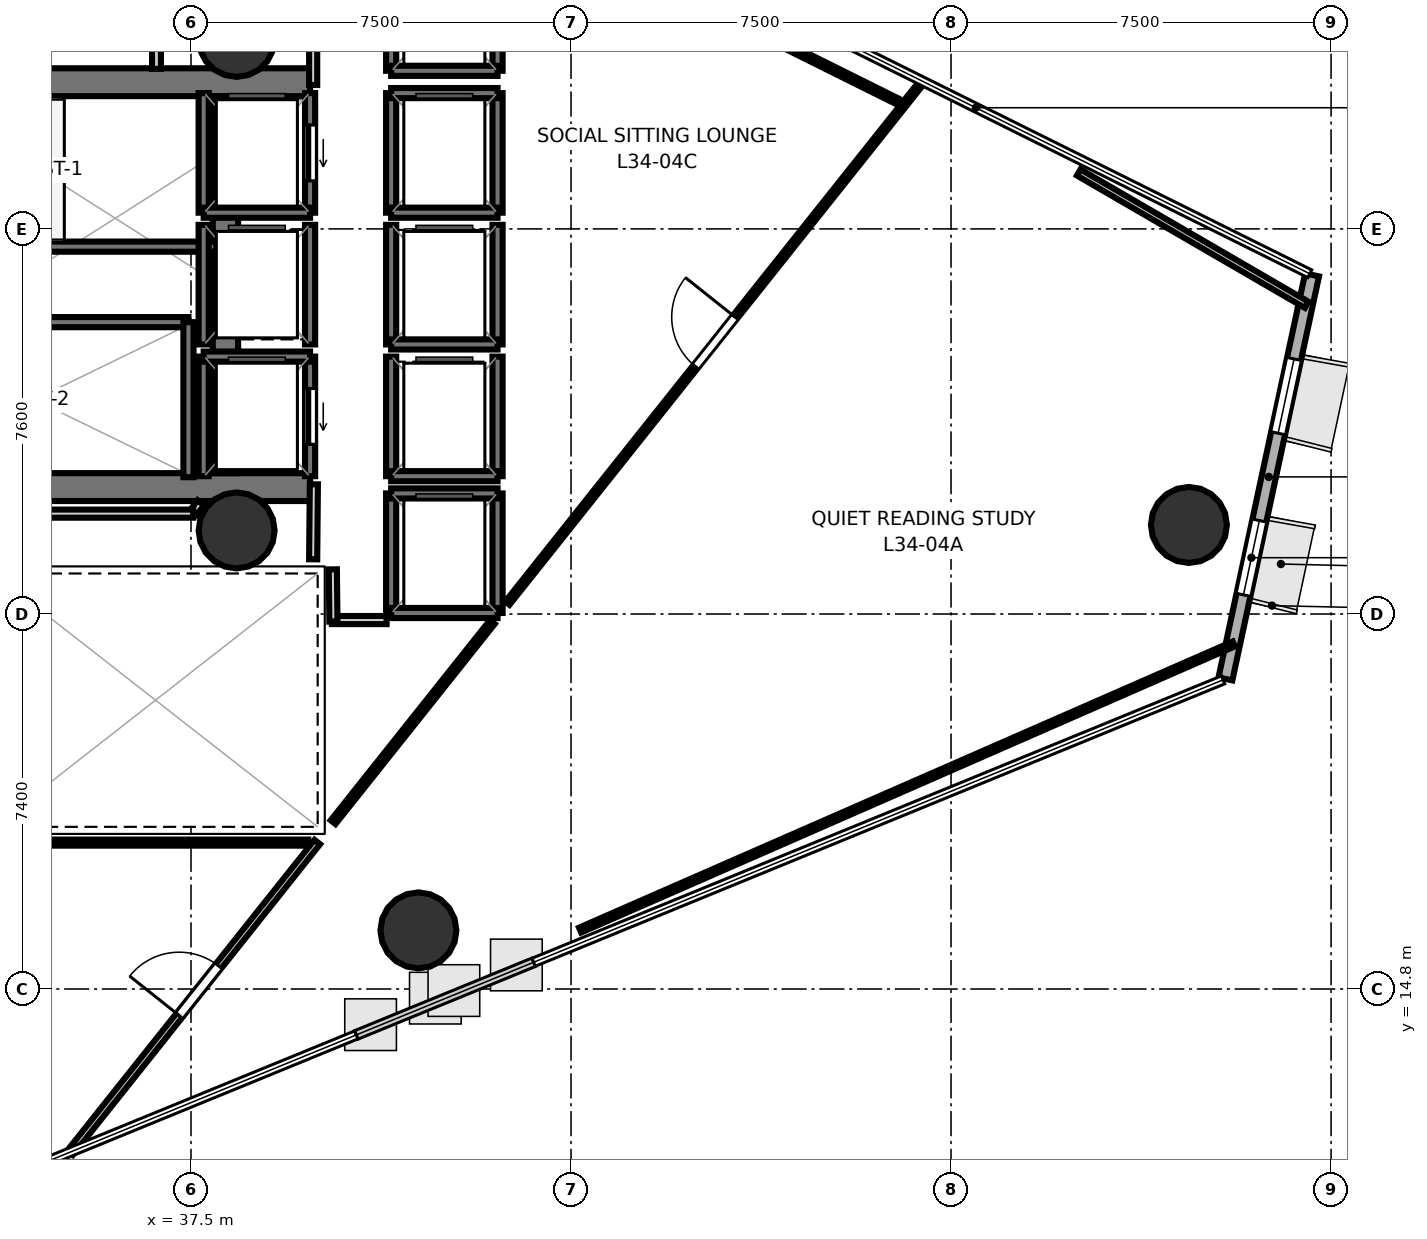
"""IFC4 building model, lengths in metres.
Left out: names, types, materials, properties, quantities, classifications, styles, units other than length and angle.
Written with IfcOpenShell. Run it as: python <this file> out.ifc"""

import sys

from ifc_helpers import new_model, si_unit, direction, frame, frame_2d, origin, origin_2d, place, context, subcontext, project, spatial, rectangle, hollow_circle, extrude, element, fill, save


model = new_model("IFC4")
c1 = context("Model", 3, precision=1e-05, world=origin(), true_north=direction((0.0, 1.0)))
c2 = subcontext(c1, "Body", "Model", "MODEL_VIEW")
j1 = project(units=[si_unit("LENGTHUNIT", "METRE"), si_unit("PLANEANGLEUNIT", "RADIAN")], contexts=[c1])
p1 = place(None, origin())
s1 = spatial("IfcSite", under=j1, at=p1, CompositionType="ELEMENT")
p2 = place(p1, origin())
s2 = spatial("IfcBuilding", under=s1, at=p2, CompositionType="ELEMENT")
p3 = place(p2, frame((0.0, 0.0, 134.8)))
s3 = spatial("IfcBuildingStorey", under=s2, at=p3, CompositionType="ELEMENT", Elevation=134.8)
p4 = place(p3, frame((29.23, 32.695, 0.0), z_axis=(0.0, 0.0, 1.0), x_axis=(1.0, 0.0, 0.0)))
e1 = element("IfcWall", 1, at=p4, inside=s3, PredefinedType="SHEAR", context=c2, shape_type="SweptSolid", body=[
    extrude(rectangle(XDim=10.62, YDim=0.55, at=frame_2d((5.31, 0.0))), origin(), (0.0, 0.0, 1.0), 3.4),
])
p5 = place(p4, frame((0.995, 0.0, 0.0)))
e2 = element("IfcOpeningElement", 2, at=p5, cuts=e1, PredefinedType="OPENING", context=c2, shape_type="SweptSolid", body=[
    extrude(rectangle(XDim=1.25, YDim=2.15, at=frame_2d((0.625, 1.075))), frame((0.0, 0.285, 0.0), z_axis=(0.0, -1.0, 0.0), x_axis=(1.0, 0.0, 0.0)), (0.0, 0.0, 1.0), 0.57),
])
p6 = place(p3, frame((29.23, 24.705, 0.0), z_axis=(0.0, 0.0, 1.0), x_axis=(1.0, 0.0, 0.0)))
e3 = element("IfcWall", 3, at=p6, inside=s3, PredefinedType="SHEAR", context=c2, shape_type="SweptSolid", body=[
    extrude(rectangle(XDim=10.62, YDim=0.55, at=frame_2d((5.31, 0.0))), origin(), (0.0, 0.0, 1.0), 3.4),
])
p7 = place(p6, frame((0.795, 0.0, 0.0)))
e4 = element("IfcOpeningElement", 4, at=p7, cuts=e3, PredefinedType="OPENING", context=c2, shape_type="SweptSolid", body=[
    extrude(rectangle(XDim=1.25, YDim=2.15, at=frame_2d((0.625, 1.075))), frame((0.0, 0.285, 0.0), z_axis=(0.0, -1.0, 0.0), x_axis=(1.0, 0.0, 0.0)), (0.0, 0.0, 1.0), 0.57),
])
p8 = place(p3, frame((38.18, 24.98, 0.0), z_axis=(0.0, 0.0, 1.0), x_axis=(0.0, 1.0, 0.0)))
e5 = element("IfcWall", 5, at=p8, inside=s3, PredefinedType="SHEAR", context=c2, shape_type="SweptSolid", body=[
    extrude(rectangle(XDim=7.44, YDim=0.5, at=frame_2d((3.72, 0.0))), origin(), (0.0, 0.0, 1.0), 3.4),
])
for number, where, z_axis, x_axis in (
    (6, (38.4, 33.55, 0.0), (0.0, 0.0, 1.0), (1.0, 0.0, 0.0)),
    (7, (38.4, 23.85, 0.0), (0.0, 0.0, 1.0), (1.0, 0.0, 0.0)),
    (8, (57.194, 23.958, 0.0), (0.0, 0.0, 1.0), (1.0, 0.0, 0.0)),
    (9, (41.988, 15.957, 0.0), (0.0, 0.0, 1.0), (1.0, 0.0, 0.0)),
):
    element("IfcColumn", number, at=place(p3, frame(where, z_axis=z_axis, x_axis=x_axis)), inside=s3, PredefinedType="COLUMN", context=c2, shape_type="SweptSolid", body=[
        extrude(hollow_circle(Radius=0.75, WallThickness=0.036, at=origin_2d()), origin(), (0.0, 0.0, 1.0), 3.7),
    ])
p9 = place(p3, frame((57.915, 20.92, 0.0), z_axis=(0.0, 0.0, 1.0), x_axis=(0.209674261985, 0.977771294251, 0.0)))
e10 = element("IfcWall", 10, at=p9, inside=s3, PredefinedType="SOLIDWALL", context=c2, shape_type="SweptSolid", body=[
    extrude(rectangle(XDim=8.154, YDim=0.28, at=frame_2d((4.077, 0.0))), origin(), (0.0, 0.0, 1.0), 3.4),
])
p10 = place(p9, frame((1.696, 0.0, 0.85)))
e11 = element("IfcOpeningElement", 11, at=p10, cuts=e10, PredefinedType="OPENING", context=c2, shape_type="SweptSolid", body=[
    extrude(rectangle(XDim=1.5, YDim=2.1, at=frame_2d((0.75, 1.05))), frame((0.0, 0.15, 0.0), z_axis=(0.0, -1.0, 0.0), x_axis=(1.0, 0.0, 0.0)), (0.0, 0.0, 1.0), 0.3),
])
p11 = place(p9, frame((4.958, 0.0, 0.85)))
e12 = element("IfcOpeningElement", 12, at=p11, cuts=e10, PredefinedType="OPENING", context=c2, shape_type="SweptSolid", body=[
    extrude(rectangle(XDim=1.5, YDim=2.1, at=frame_2d((0.75, 1.05))), frame((0.0, 0.15, 0.0), z_axis=(0.0, -1.0, 0.0), x_axis=(1.0, 0.0, 0.0)), (0.0, 0.0, 1.0), 0.3),
])
p12 = place(p3, frame((29.7, 29.45, 0.0), z_axis=(0.0, 0.0, 1.0), x_axis=(1.0, 0.0, 0.0)))
e13 = element("IfcWall", 13, at=p12, inside=s3, PredefinedType="SOLIDWALL", context=c2, shape_type="SweptSolid", body=[
    extrude(rectangle(XDim=8.3, YDim=0.2, at=frame_2d((4.15, 0.0))), origin(), (0.0, 0.0, 1.0), 3.4),
])
p13 = place(p3, frame((29.7, 27.96, 0.0), z_axis=(0.0, 0.0, 1.0), x_axis=(1.0, 0.0, 0.0)))
e14 = element("IfcWall", 14, at=p13, inside=s3, PredefinedType="SOLIDWALL", context=c2, shape_type="SweptSolid", body=[
    extrude(rectangle(XDim=7.75, YDim=0.2, at=frame_2d((3.875, 0.0))), origin(), (0.0, 0.0, 1.0), 3.4),
])
p14 = place(p3, frame((37.45, 24.9, 0.0), z_axis=(0.0, 0.0, 1.0), x_axis=(0.0, 1.0, 0.0)))
e15 = element("IfcWall", 15, at=p14, inside=s3, PredefinedType="SOLIDWALL", context=c2, shape_type="SweptSolid", body=[
    extrude(rectangle(XDim=3.06, YDim=0.2, at=frame_2d((1.53, 0.0))), origin(), (0.0, 0.0, 1.0), 3.4),
])
p15 = place(p3, frame((39.85, 30.12, 0.0), z_axis=(0.0, 0.0, 1.0), x_axis=(0.0, 1.0, 0.0)))
e16 = element("IfcWall", 16, at=p15, inside=s3, PredefinedType="SOLIDWALL", context=c2, shape_type="SweptSolid", body=[
    extrude(rectangle(XDim=2.36, YDim=0.2, at=frame_2d((1.18, 0.0))), origin(), (0.0, 0.0, 1.0), 3.4),
])
p16 = place(p15, frame((0.63, 0.0, 0.0)))
e17 = element("IfcOpeningElement", 17, at=p16, cuts=e16, PredefinedType="OPENING", context=c2, shape_type="SweptSolid", body=[
    extrude(rectangle(XDim=1.1, YDim=2.15, at=frame_2d((0.55, 1.075))), frame((0.0, 0.11, 0.0), z_axis=(0.0, -1.0, 0.0), x_axis=(1.0, 0.0, 0.0)), (0.0, 0.0, 1.0), 0.22),
])
p17 = place(p3, frame((37.75, 30.12, 0.0), z_axis=(0.0, 0.0, 1.0), x_axis=(0.0, 1.0, 0.0)))
e18 = element("IfcWall", 18, at=p17, inside=s3, PredefinedType="SOLIDWALL", context=c2, shape_type="SweptSolid", body=[
    extrude(rectangle(XDim=2.36, YDim=0.2, at=frame_2d((1.18, 0.0))), origin(), (0.0, 0.0, 1.0), 3.4),
])
p18 = place(p3, frame((37.75, 30.12, 0.0), z_axis=(0.0, 0.0, 1.0), x_axis=(1.0, 0.0, 0.0)))
e19 = element("IfcWall", 19, at=p18, inside=s3, PredefinedType="SOLIDWALL", context=c2, shape_type="SweptSolid", body=[
    extrude(rectangle(XDim=2.1, YDim=0.2, at=frame_2d((1.05, 0.0))), origin(), (0.0, 0.0, 1.0), 3.4),
])
p19 = place(p3, frame((39.85, 24.92, 0.0), z_axis=(0.0, 0.0, 1.0), x_axis=(0.0, 1.0, 0.0)))
e20 = element("IfcWall", 20, at=p19, inside=s3, PredefinedType="SOLIDWALL", context=c2, shape_type="SweptSolid", body=[
    extrude(rectangle(XDim=2.36, YDim=0.2, at=frame_2d((1.18, 0.0))), origin(), (0.0, 0.0, 1.0), 3.4),
])
p20 = place(p19, frame((0.63, 0.0, 0.0)))
e21 = element("IfcOpeningElement", 21, at=p20, cuts=e20, PredefinedType="OPENING", context=c2, shape_type="SweptSolid", body=[
    extrude(rectangle(XDim=1.1, YDim=2.15, at=frame_2d((0.55, 1.075))), frame((0.0, 0.11, 0.0), z_axis=(0.0, -1.0, 0.0), x_axis=(1.0, 0.0, 0.0)), (0.0, 0.0, 1.0), 0.22),
])
p21 = place(p3, frame((37.75, 24.92, 0.0), z_axis=(0.0, 0.0, 1.0), x_axis=(0.0, 1.0, 0.0)))
e22 = element("IfcWall", 22, at=p21, inside=s3, PredefinedType="SOLIDWALL", context=c2, shape_type="SweptSolid", body=[
    extrude(rectangle(XDim=2.36, YDim=0.2, at=frame_2d((1.18, 0.0))), origin(), (0.0, 0.0, 1.0), 3.4),
])
p22 = place(p3, frame((37.75, 27.28, 0.0), z_axis=(0.0, 0.0, 1.0), x_axis=(1.0, 0.0, 0.0)))
e23 = element("IfcWall", 23, at=p22, inside=s3, PredefinedType="SOLIDWALL", context=c2, shape_type="SweptSolid", body=[
    extrude(rectangle(XDim=2.1, YDim=0.2, at=frame_2d((1.05, 0.0))), origin(), (0.0, 0.0, 1.0), 3.4),
])
for number, where, z_axis, x_axis in (
    (24, (43.55, 30.12, 0.0), (0.0, 0.0, 1.0), (0.0, 1.0, 0.0)),
    (25, (41.45, 30.12, 0.0), (0.0, 0.0, 1.0), (0.0, 1.0, 0.0)),
):
    element("IfcWall", number, at=place(p3, frame(where, z_axis=z_axis, x_axis=x_axis)), inside=s3, PredefinedType="SOLIDWALL", context=c2, shape_type="SweptSolid", body=[
        extrude(rectangle(XDim=2.36, YDim=0.2, at=frame_2d((1.18, 0.0))), origin(), (0.0, 0.0, 1.0), 3.4),
    ])
for number, where, z_axis, x_axis in (
    (26, (41.45, 32.48, 0.0), (0.0, 0.0, 1.0), (1.0, 0.0, 0.0)),
    (27, (41.45, 30.12, 0.0), (0.0, 0.0, 1.0), (1.0, 0.0, 0.0)),
):
    element("IfcWall", number, at=place(p3, frame(where, z_axis=z_axis, x_axis=x_axis)), inside=s3, PredefinedType="SOLIDWALL", context=c2, shape_type="SweptSolid", body=[
        extrude(rectangle(XDim=2.1, YDim=0.2, at=frame_2d((1.05, 0.0))), origin(), (0.0, 0.0, 1.0), 3.4),
    ])
for number, where, z_axis, x_axis in (
    (28, (43.55, 27.52, 0.0), (0.0, 0.0, 1.0), (0.0, 1.0, 0.0)),
    (29, (41.45, 27.52, 0.0), (0.0, 0.0, 1.0), (0.0, 1.0, 0.0)),
):
    element("IfcWall", number, at=place(p3, frame(where, z_axis=z_axis, x_axis=x_axis)), inside=s3, PredefinedType="SOLIDWALL", context=c2, shape_type="SweptSolid", body=[
        extrude(rectangle(XDim=2.36, YDim=0.2, at=frame_2d((1.18, 0.0))), origin(), (0.0, 0.0, 1.0), 3.4),
    ])
p23 = place(p3, frame((41.45, 27.52, 0.0), z_axis=(0.0, 0.0, 1.0), x_axis=(1.0, 0.0, 0.0)))
e30 = element("IfcWall", 30, at=p23, inside=s3, PredefinedType="SOLIDWALL", context=c2, shape_type="SweptSolid", body=[
    extrude(rectangle(XDim=2.1, YDim=0.2, at=frame_2d((1.05, 0.0))), origin(), (0.0, 0.0, 1.0), 3.4),
])
for number, where, z_axis, x_axis in (
    (31, (43.55, 24.92, 0.0), (0.0, 0.0, 1.0), (0.0, 1.0, 0.0)),
    (32, (41.45, 24.92, 0.0), (0.0, 0.0, 1.0), (0.0, 1.0, 0.0)),
):
    element("IfcWall", number, at=place(p3, frame(where, z_axis=z_axis, x_axis=x_axis)), inside=s3, PredefinedType="SOLIDWALL", context=c2, shape_type="SweptSolid", body=[
        extrude(rectangle(XDim=2.36, YDim=0.2, at=frame_2d((1.18, 0.0))), origin(), (0.0, 0.0, 1.0), 3.4),
    ])
p24 = place(p3, frame((41.45, 24.92, 0.0), z_axis=(0.0, 0.0, 1.0), x_axis=(1.0, 0.0, 0.0)))
e33 = element("IfcWall", 33, at=p24, inside=s3, PredefinedType="SOLIDWALL", context=c2, shape_type="SweptSolid", body=[
    extrude(rectangle(XDim=2.1, YDim=0.2, at=frame_2d((1.05, 0.0))), origin(), (0.0, 0.0, 1.0), 3.4),
])
for number, where, z_axis, x_axis in (
    (34, (39.85, 27.52, 0.0), (0.0, 0.0, 1.0), (0.0, 1.0, 0.0)),
    (35, (37.75, 27.52, 0.0), (0.0, 0.0, 1.0), (0.0, 1.0, 0.0)),
):
    element("IfcWall", number, at=place(p3, frame(where, z_axis=z_axis, x_axis=x_axis)), inside=s3, PredefinedType="SOLIDWALL", context=c2, shape_type="SweptSolid", body=[
        extrude(rectangle(XDim=2.36, YDim=0.2, at=frame_2d((1.18, 0.0))), origin(), (0.0, 0.0, 1.0), 3.4),
    ])
for number, where, z_axis, x_axis in (
    (36, (43.55, 22.22, 0.0), (0.0, 0.0, 1.0), (0.0, 1.0, 0.0)),
    (37, (41.45, 22.22, 0.0), (0.0, 0.0, 1.0), (0.0, 1.0, 0.0)),
):
    element("IfcWall", number, at=place(p3, frame(where, z_axis=z_axis, x_axis=x_axis)), inside=s3, PredefinedType="SOLIDWALL", context=c2, shape_type="SweptSolid", body=[
        extrude(rectangle(XDim=2.36, YDim=0.2, at=frame_2d((1.18, 0.0))), origin(), (0.0, 0.0, 1.0), 3.4),
    ])
for number, where, z_axis, x_axis in (
    (38, (41.45, 24.58, 0.0), (0.0, 0.0, 1.0), (1.0, 0.0, 0.0)),
    (39, (41.45, 22.22, 0.0), (0.0, 0.0, 1.0), (1.0, 0.0, 0.0)),
):
    element("IfcWall", number, at=place(p3, frame(where, z_axis=z_axis, x_axis=x_axis)), inside=s3, PredefinedType="SOLIDWALL", context=c2, shape_type="SweptSolid", body=[
        extrude(rectangle(XDim=2.1, YDim=0.2, at=frame_2d((1.05, 0.0))), origin(), (0.0, 0.0, 1.0), 3.4),
    ])
for number, where, z_axis, x_axis in (
    (40, (43.55, 32.92, 0.0), (0.0, 0.0, 1.0), (0.0, 1.0, 0.0)),
    (41, (41.45, 32.92, 0.0), (0.0, 0.0, 1.0), (0.0, 1.0, 0.0)),
):
    element("IfcWall", number, at=place(p3, frame(where, z_axis=z_axis, x_axis=x_axis)), inside=s3, PredefinedType="SOLIDWALL", context=c2, shape_type="SweptSolid", body=[
        extrude(rectangle(XDim=2.36, YDim=0.2, at=frame_2d((1.18, 0.0))), origin(), (0.0, 0.0, 1.0), 3.4),
    ])
p25 = place(p3, frame((41.45, 32.92, 0.0), z_axis=(0.0, 0.0, 1.0), x_axis=(1.0, 0.0, 0.0)))
e42 = element("IfcWall", 42, at=p25, inside=s3, PredefinedType="SOLIDWALL", context=c2, shape_type="SweptSolid", body=[
    extrude(rectangle(XDim=2.1, YDim=0.2, at=frame_2d((1.05, 0.0))), origin(), (0.0, 0.0, 1.0), 3.4),
])
p26 = place(p3, frame((39.911, 32.64, 0.0), z_axis=(0.0, 0.0, 1.0), x_axis=(0.0, 1.0, 0.0)))
e43 = element("IfcWall", 43, at=p26, inside=s3, PredefinedType="PARTITIONING", context=c2, shape_type="SweptSolid", body=[
    extrude(rectangle(XDim=4.01, YDim=0.16, at=frame_2d((2.005, 0.0))), origin(), (0.0, 0.0, 1.0), 2.72),
])
p27 = place(p26, frame((3.01, 0.0, 0.0)))
e44 = element("IfcOpeningElement", 44, at=p27, cuts=e43, PredefinedType="OPENING", context=c2, shape_type="SweptSolid", body=[
    extrude(rectangle(XDim=0.86, YDim=2.05, at=frame_2d((0.43, 1.025))), frame((0.0, 0.09, 0.0), z_axis=(0.0, -1.0, 0.0), x_axis=(1.0, 0.0, 0.0)), (0.0, 0.0, 1.0), 0.18),
])
p28 = place(p3, frame((41.36, 22.081, 0.0), z_axis=(0.0, 0.0, 1.0), x_axis=(-1.0, 0.0, 0.0)))
e45 = element("IfcWall", 45, at=p28, inside=s3, PredefinedType="PARTITIONING", context=c2, shape_type="SweptSolid", body=[
    extrude(rectangle(XDim=1.08, YDim=0.16, at=frame_2d((0.54, 0.0))), origin(), (0.0, 0.0, 1.0), 2.72),
])
p29 = place(p3, frame((40.311, 22.05, 0.0), z_axis=(0.0, 0.0, 1.0), x_axis=(-0.011836292006, 0.999929948642, 0.0)))
e46 = element("IfcWall", 46, at=p29, inside=s3, PredefinedType="PARTITIONING", context=c2, shape_type="SweptSolid", body=[
    extrude(rectangle(XDim=1.031, YDim=0.16, at=frame_2d((0.516, 0.0))), origin(), (0.0, 0.0, 1.0), 2.72),
])
p30 = place(p3, frame((39.911, 23.28, 0.0), z_axis=(0.0, 0.0, 1.0), x_axis=(0.009397771291, 0.999955839972, 0.0)))
e47 = element("IfcWall", 47, at=p30, inside=s3, PredefinedType="PARTITIONING", context=c2, shape_type="SweptSolid", body=[
    extrude(rectangle(XDim=1.481, YDim=0.16, at=frame_2d((0.74, 0.0))), origin(), (0.0, 0.0, 1.0), 2.72),
])
p31 = place(p3, frame((36.819, 35.48, 0.0), z_axis=(0.0, 0.0, 1.0), x_axis=(0.0, -1.0, 0.0)))
e48 = element("IfcWall", 48, at=p31, inside=s3, PredefinedType="PLUMBINGWALL", context=c2, shape_type="SweptSolid", body=[
    extrude(rectangle(XDim=2.522, YDim=0.175, at=frame_2d((1.261, 0.0))), origin(), (0.0, 0.0, 1.0), 2.72),
])
p32 = place(p3, frame((37.694, 24.396, 0.0), z_axis=(0.0, 0.0, 1.0), x_axis=(-0.607118658061, -0.794611184815, 0.0)))
e49 = element("IfcWall", 49, at=p32, inside=s3, PredefinedType="PARTITIONING", context=c2, shape_type="SweptSolid", body=[
    extrude(rectangle(XDim=0.246, YDim=0.16, at=frame_2d((0.123, 0.0))), origin(), (0.0, 0.0, 1.0), 2.72),
])
p33 = place(p3, frame((37.545, 24.181, 0.0), z_axis=(0.0, 0.0, 1.0), x_axis=(-1.0, 0.0, 0.0)))
e50 = element("IfcWall", 50, at=p33, inside=s3, PredefinedType="PARTITIONING", context=c2, shape_type="SweptSolid", body=[
    extrude(rectangle(XDim=4.015, YDim=0.16, at=frame_2d((2.007, 0.0))), origin(), (0.0, 0.0, 1.0), 2.72),
])
p34 = place(p3, frame((40.304, 18.092, 0.0), z_axis=(0.0, 0.0, 1.0), x_axis=(0.622687180488, 0.782470878216, 0.0)))
e51 = element("IfcWall", 51, at=p34, inside=s3, PredefinedType="PARTITIONING", context=c2, shape_type="SweptSolid", body=[
    extrude(rectangle(XDim=5.047, YDim=0.12, at=frame_2d((2.523, 0.0))), origin(), (0.0, 0.0, 1.0), 2.72),
])
p35 = place(p3, frame((43.744, 22.414, 0.0), z_axis=(0.0, 0.0, 1.0), x_axis=(0.622689577397, 0.782468970759, 0.0)))
e52 = element("IfcWall", 52, at=p35, inside=s3, PredefinedType="PARTITIONING", context=c2, shape_type="SweptSolid", body=[
    extrude(rectangle(XDim=13.182, YDim=0.105, at=frame_2d((6.591, 0.0))), origin(), (0.0, 0.0, 1.0), 2.72),
])
p36 = place(p35, frame((5.966, 0.0, 0.0)))
e53 = element("IfcOpeningElement", 53, at=p36, cuts=e52, PredefinedType="OPENING", context=c2, shape_type="SweptSolid", body=[
    extrude(rectangle(XDim=1.25, YDim=2.2, at=frame_2d((0.625, 1.1))), frame((0.0, 0.062, 0.0), z_axis=(0.0, -1.0, 0.0), x_axis=(1.0, 0.0, 0.0)), (0.0, 0.0, 1.0), 0.125),
])
p37 = place(p3, frame((55.02, 30.914, 0.0), z_axis=(0.0, 0.0, 1.0), x_axis=(0.864820500903, -0.50208116995, 0.0)))
e54 = element("IfcWall", 54, at=p37, inside=s3, PredefinedType="PARTITIONING", context=c2, shape_type="SweptSolid", body=[
    extrude(rectangle(XDim=5.202, YDim=0.14, at=frame_2d((2.601, 0.0))), origin(), (0.0, 0.0, 1.0), 2.72),
])
p38 = place(p3, frame((58.08, 21.61, 0.0), z_axis=(0.0, 0.0, 1.0), x_axis=(-0.916084106558, -0.400986171472, 0.0)))
e55 = element("IfcWall", 55, at=p38, inside=s3, PredefinedType="PARTITIONING", context=c2, shape_type="SweptSolid", body=[
    extrude(rectangle(XDim=14.082, YDim=0.105, at=frame_2d((7.041, 0.0))), origin(), (0.0, 0.0, 1.0), 2.72),
])
p39 = place(p3, frame((35.114, 11.57, 0.0), z_axis=(0.0, 0.0, 1.0), x_axis=(0.622682737299, 0.782474414067, 0.0)))
e56 = element("IfcWall", 56, at=p39, inside=s3, PredefinedType="PARTITIONING", context=c2, shape_type="SweptSolid", body=[
    extrude(rectangle(XDim=7.835, YDim=0.14, at=frame_2d((3.917, 0.0))), origin(), (0.0, 0.0, 1.0), 2.72),
])
p40 = place(p39, frame((3.459, 0.0, 0.0)))
e57 = element("IfcOpeningElement", 57, at=p40, cuts=e56, PredefinedType="OPENING", context=c2, shape_type="SweptSolid", body=[
    extrude(rectangle(XDim=1.25, YDim=2.2, at=frame_2d((0.625, 1.1))), frame((0.0, 0.08, 0.0), z_axis=(0.0, -1.0, 0.0), x_axis=(1.0, 0.0, 0.0)), (0.0, 0.0, 1.0), 0.16),
])
p41 = place(p3, frame((33.6, 17.689, 0.0), z_axis=(0.0, 0.0, 1.0), x_axis=(1.0, 0.0, 0.0)))
e58 = element("IfcWall", 58, at=p41, inside=s3, PredefinedType="PARTITIONING", context=c2, shape_type="SweptSolid", body=[
    extrude(rectangle(XDim=6.215, YDim=0.12, at=frame_2d((3.107, 0.0))), origin(), (0.0, 0.0, 1.0), 2.72),
])
p42 = place(p3, frame((42.916, 36.556, 0.0), z_axis=(0.0, 0.0, 1.0), x_axis=(0.895450730662, -0.445160632758, 0.0)))
e59 = element("IfcWall", 59, at=p42, inside=s3, PredefinedType="PARTITIONING", context=c2, shape_type="SweptSolid", body=[
    extrude(rectangle(XDim=9.519, YDim=0.12, at=frame_2d((4.76, 0.0))), origin(), (0.0, 0.0, 1.0), 2.72),
])
p43 = place(p16, origin())
e60 = element("IfcDoor", 60, at=p43, inside=s3, OperationType="SLIDING_TO_LEFT", PredefinedType="DOOR", context=c2, shape_type="SweptSolid", body=[
    extrude(rectangle(XDim=1.1, YDim=2.15, at=frame_2d((0.55, 1.075))), frame((0.0, 0.025, 0.0), z_axis=(0.0, -1.0, 0.0), x_axis=(1.0, 0.0, 0.0)), (0.0, 0.0, 1.0), 0.05),
])
fill(e17, e60)
p44 = place(p20, origin())
e61 = element("IfcDoor", 61, at=p44, inside=s3, OperationType="SLIDING_TO_LEFT", PredefinedType="DOOR", context=c2, shape_type="SweptSolid", body=[
    extrude(rectangle(XDim=1.1, YDim=2.15, at=frame_2d((0.55, 1.075))), frame((0.0, 0.025, 0.0), z_axis=(0.0, -1.0, 0.0), x_axis=(1.0, 0.0, 0.0)), (0.0, 0.0, 1.0), 0.05),
])
fill(e21, e61)
p45 = place(p40, origin())
e62 = element("IfcDoor", 62, at=p45, inside=s3, OperationType="SINGLE_SWING_LEFT", PredefinedType="DOOR", context=c2, shape_type="SweptSolid", body=[
    extrude(rectangle(XDim=1.25, YDim=2.2, at=frame_2d((0.625, 1.1))), frame((0.0, 0.025, 0.0), z_axis=(0.0, -1.0, 0.0), x_axis=(1.0, 0.0, 0.0)), (0.0, 0.0, 1.0), 0.05),
])
fill(e57, e62)
p46 = place(p36, origin())
e63 = element("IfcDoor", 63, at=p46, inside=s3, OperationType="SINGLE_SWING_RIGHT", PredefinedType="DOOR", context=c2, shape_type="SweptSolid", body=[
    extrude(rectangle(XDim=1.25, YDim=2.2, at=frame_2d((0.625, 1.1))), frame((0.0, 0.025, 0.0), z_axis=(0.0, -1.0, 0.0), x_axis=(1.0, 0.0, 0.0)), (0.0, 0.0, 1.0), 0.05),
])
fill(e53, e63)
p47 = place(p10, origin())
e64 = element("IfcWindow", 64, at=p47, inside=s3, PartitioningType="SINGLE_PANEL", PredefinedType="WINDOW", context=c2, shape_type="SweptSolid", body=[
    extrude(rectangle(XDim=1.5, YDim=2.1, at=frame_2d((0.75, 1.05))), frame((0.0, 0.03, 0.0), z_axis=(0.0, -1.0, 0.0), x_axis=(1.0, 0.0, 0.0)), (0.0, 0.0, 1.0), 0.06),
])
fill(e11, e64)
p48 = place(p11, origin())
e65 = element("IfcWindow", 65, at=p48, inside=s3, PartitioningType="SINGLE_PANEL", PredefinedType="WINDOW", context=c2, shape_type="SweptSolid", body=[
    extrude(rectangle(XDim=1.5, YDim=2.1, at=frame_2d((0.75, 1.05))), frame((0.0, 0.03, 0.0), z_axis=(0.0, -1.0, 0.0), x_axis=(1.0, 0.0, 0.0)), (0.0, 0.0, 1.0), 0.06),
])
fill(e12, e65)
save(model, sys.argv[1])
